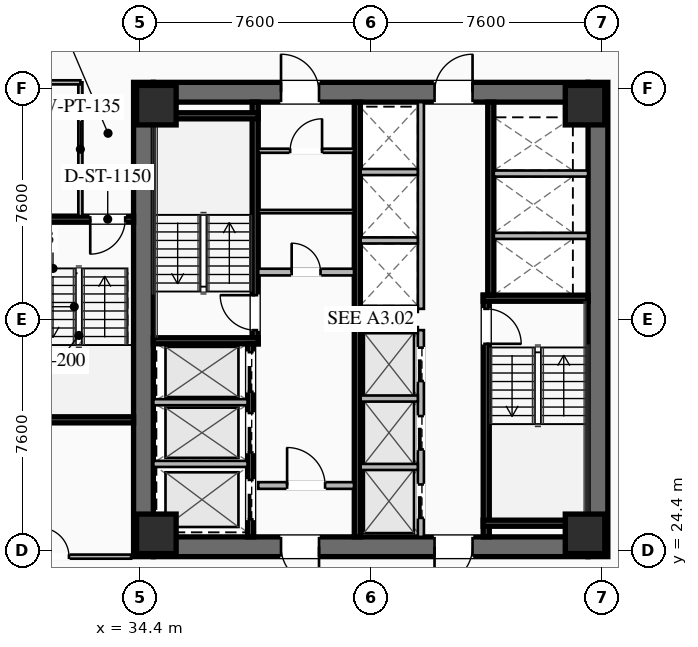
"""IFC4 building model, lengths in metres.
Left out: names, types, materials, properties, quantities, classifications, styles, units other than length and angle.
Written with IfcOpenShell. Run it as: python <this file> out.ifc"""

import sys

from ifc_helpers import new_model, si_unit, direction, frame, frame_2d, origin, origin_2d, place, context, subcontext, project, spatial, rectangle, hollow_rectangle, extrude, element, fill, save


model = new_model("IFC4")
c1 = context("Model", 3, precision=1e-05, world=origin(), true_north=direction((0.0, 1.0)))
c2 = subcontext(c1, "Body", "Model", "MODEL_VIEW")
j1 = project(units=[si_unit("LENGTHUNIT", "METRE"), si_unit("PLANEANGLEUNIT", "RADIAN")], contexts=[c1])
p1 = place(None, origin())
s1 = spatial("IfcSite", under=j1, at=p1, CompositionType="ELEMENT")
p2 = place(p1, origin())
s2 = spatial("IfcBuilding", under=s1, at=p2, CompositionType="ELEMENT")
p3 = place(p2, frame((0.0, 0.0, 84.95)))
s3 = spatial("IfcBuildingStorey", under=s2, at=p3, CompositionType="ELEMENT", Elevation=84.95)
for number, where, z_axis, x_axis in (
    (1, (34.525, 24.2, 0.0), (0.0, 0.0, 1.0), (0.0, 1.0, 0.0)),
    (2, (49.475, 39.8, 0.0), (0.0, 0.0, 1.0), (0.0, -1.0, 0.0)),
):
    element("IfcWall", number, at=place(p3, frame(where, z_axis=z_axis, x_axis=x_axis)), inside=s3, PredefinedType="SHEAR", context=c2, shape_type="SweptSolid", body=[
        extrude(rectangle(XDim=15.6, YDim=0.65, at=frame_2d((7.8, 0.0))), origin(), (0.0, 0.0, 1.0), 3.55),
    ])
p4 = place(p3, frame((49.15, 24.525, 0.0), z_axis=(0.0, 0.0, 1.0), x_axis=(-1.0, 0.0, 0.0)))
e3 = element("IfcWall", 3, at=p4, inside=s3, PredefinedType="SHEAR", context=c2, shape_type="SweptSolid", body=[
    extrude(rectangle(XDim=14.3, YDim=0.65, at=frame_2d((7.15, 0.0))), origin(), (0.0, 0.0, 1.0), 3.55),
])
p5 = place(p4, frame((8.85, 0.0, 0.0)))
e4 = element("IfcOpeningElement", 4, at=p5, cuts=e3, PredefinedType="OPENING", context=c2, shape_type="SweptSolid", body=[
    extrude(rectangle(XDim=1.25, YDim=2.25, at=frame_2d((0.625, 1.125))), frame((0.0, 0.335, 0.0), z_axis=(0.0, -1.0, 0.0), x_axis=(1.0, 0.0, 0.0)), (0.0, 0.0, 1.0), 0.67),
])
p6 = place(p4, frame((3.8, 0.0, 0.0)))
e5 = element("IfcOpeningElement", 5, at=p6, cuts=e3, PredefinedType="OPENING", context=c2, shape_type="SweptSolid", body=[
    extrude(rectangle(XDim=1.25, YDim=2.25, at=frame_2d((0.625, 1.125))), frame((0.0, 0.335, 0.0), z_axis=(0.0, -1.0, 0.0), x_axis=(1.0, 0.0, 0.0)), (0.0, 0.0, 1.0), 0.67),
])
p7 = place(p3, frame((34.85, 39.475, 0.0), z_axis=(0.0, 0.0, 1.0), x_axis=(1.0, 0.0, 0.0)))
e6 = element("IfcWall", 6, at=p7, inside=s3, PredefinedType="SHEAR", context=c2, shape_type="SweptSolid", body=[
    extrude(rectangle(XDim=14.3, YDim=0.65, at=frame_2d((7.15, 0.0))), origin(), (0.0, 0.0, 1.0), 3.55),
])
p8 = place(p7, frame((4.2, 0.0, 0.0)))
e7 = element("IfcOpeningElement", 7, at=p8, cuts=e6, PredefinedType="OPENING", context=c2, shape_type="SweptSolid", body=[
    extrude(rectangle(XDim=1.25, YDim=2.25, at=frame_2d((0.625, 1.125))), frame((0.0, 0.335, 0.0), z_axis=(0.0, -1.0, 0.0), x_axis=(1.0, 0.0, 0.0)), (0.0, 0.0, 1.0), 0.67),
])
p9 = place(p7, frame((9.25, 0.0, 0.0)))
e8 = element("IfcOpeningElement", 8, at=p9, cuts=e6, PredefinedType="OPENING", context=c2, shape_type="SweptSolid", body=[
    extrude(rectangle(XDim=1.25, YDim=2.25, at=frame_2d((0.625, 1.125))), frame((0.0, 0.335, 0.0), z_axis=(0.0, -1.0, 0.0), x_axis=(1.0, 0.0, 0.0)), (0.0, 0.0, 1.0), 0.67),
])
for number, where, z_axis, x_axis in (
    (9, (34.95, 24.95, 0.0), (0.0, 0.0, 1.0), (1.0, 0.0, 0.0)),
    (10, (49.05, 24.95, 0.0), (0.0, 0.0, 1.0), (1.0, 0.0, 0.0)),
    (11, (49.05, 39.05, 0.0), (0.0, 0.0, 1.0), (1.0, 0.0, 0.0)),
    (12, (34.95, 39.05, 0.0), (0.0, 0.0, 1.0), (1.0, 0.0, 0.0)),
):
    element("IfcColumn", number, at=place(p3, frame(where, z_axis=z_axis, x_axis=x_axis)), inside=s3, PredefinedType="COLUMN", context=c2, shape_type="SweptSolid", body=[
        extrude(hollow_rectangle(XDim=1.3, YDim=1.3, WallThickness=0.05, at=origin_2d()), origin(), (0.0, 0.0, 1.0), 3.35),
    ])
p10 = place(p3, frame((38.2, 31.2, 0.0), z_axis=(0.0, 0.0, 1.0), x_axis=(0.0, 1.0, 0.0)))
e13 = element("IfcWall", 13, at=p10, inside=s3, PredefinedType="SHEAR", context=c2, shape_type="SweptSolid", body=[
    extrude(rectangle(XDim=7.95, YDim=0.2, at=frame_2d((3.975, 0.0))), origin(), (0.0, 0.0, 1.0), 3.35),
])
p11 = place(p10, frame((0.45, 0.0, 0.0)))
e14 = element("IfcOpeningElement", 14, at=p11, cuts=e13, PredefinedType="OPENING", context=c2, shape_type="SweptSolid", body=[
    extrude(rectangle(XDim=1.15, YDim=2.2, at=frame_2d((0.575, 1.1))), frame((0.0, 0.11, 0.0), z_axis=(0.0, -1.0, 0.0), x_axis=(1.0, 0.0, 0.0)), (0.0, 0.0, 1.0), 0.22),
])
for number, where, z_axis, x_axis in (
    (15, (34.85, 31.3, 0.0), (0.0, 0.0, 1.0), (1.0, 0.0, 0.0)),
    (16, (34.85, 38.7, 0.0), (0.0, 0.0, 1.0), (1.0, 0.0, 0.0)),
):
    element("IfcWall", number, at=place(p3, frame(where, z_axis=z_axis, x_axis=x_axis)), inside=s3, PredefinedType="SHEAR", context=c2, shape_type="SweptSolid", body=[
        extrude(rectangle(XDim=3.45, YDim=0.2, at=frame_2d((1.725, 0.0))), origin(), (0.0, 0.0, 1.0), 3.35),
    ])
p12 = place(p3, frame((45.8, 32.8, 0.0), z_axis=(0.0, 0.0, 1.0), x_axis=(0.0, -1.0, 0.0)))
e17 = element("IfcWall", 17, at=p12, inside=s3, PredefinedType="SHEAR", context=c2, shape_type="SweptSolid", body=[
    extrude(rectangle(XDim=7.95, YDim=0.2, at=frame_2d((3.975, 0.0))), origin(), (0.0, 0.0, 1.0), 3.35),
])
p13 = place(p12, frame((0.45, 0.0, 0.0)))
e18 = element("IfcOpeningElement", 18, at=p13, cuts=e17, PredefinedType="OPENING", context=c2, shape_type="SweptSolid", body=[
    extrude(rectangle(XDim=1.15, YDim=2.2, at=frame_2d((0.575, 1.1))), frame((0.0, 0.11, 0.0), z_axis=(0.0, -1.0, 0.0), x_axis=(1.0, 0.0, 0.0)), (0.0, 0.0, 1.0), 0.22),
])
for number, where, z_axis, x_axis in (
    (19, (45.7, 32.7, 0.0), (0.0, 0.0, 1.0), (1.0, 0.0, 0.0)),
    (20, (45.7, 25.3, 0.0), (0.0, 0.0, 1.0), (1.0, 0.0, 0.0)),
):
    element("IfcWall", number, at=place(p3, frame(where, z_axis=z_axis, x_axis=x_axis)), inside=s3, PredefinedType="SHEAR", context=c2, shape_type="SweptSolid", body=[
        extrude(rectangle(XDim=3.45, YDim=0.2, at=frame_2d((1.725, 0.0))), origin(), (0.0, 0.0, 1.0), 3.35),
    ])
p14 = place(p3, frame((41.56, 24.85, 0.0), z_axis=(0.0, 0.0, 1.0), x_axis=(0.0, 1.0, 0.0)))
e21 = element("IfcWall", 21, at=p14, inside=s3, PredefinedType="SHEAR", context=c2, shape_type="SweptSolid", body=[
    extrude(rectangle(XDim=14.3, YDim=0.2, at=frame_2d((7.15, 0.0))), origin(), (0.0, 0.0, 1.0), 3.35),
])
p15 = place(p3, frame((38.3, 33.56, 0.0), z_axis=(0.0, 0.0, 1.0), x_axis=(1.0, 0.0, 0.0)))
e22 = element("IfcWall", 22, at=p15, inside=s3, PredefinedType="SOLIDWALL", context=c2, shape_type="SweptSolid", body=[
    extrude(rectangle(XDim=3.15, YDim=0.22, at=frame_2d((1.575, 0.0))), origin(), (0.0, 0.0, 1.0), 2.703),
])
p16 = place(p15, frame((1.1, 0.0, 0.0)))
e23 = element("IfcOpeningElement", 23, at=p16, cuts=e22, PredefinedType="OPENING", context=c2, shape_type="SweptSolid", body=[
    extrude(rectangle(XDim=0.95, YDim=2.05, at=frame_2d((0.475, 1.025))), frame((0.0, 0.12, 0.0), z_axis=(0.0, -1.0, 0.0), x_axis=(1.0, 0.0, 0.0)), (0.0, 0.0, 1.0), 0.24),
])
p17 = place(p3, frame((38.3, 26.54, 0.0), z_axis=(0.0, 0.0, 1.0), x_axis=(1.0, 0.0, 0.0)))
e24 = element("IfcWall", 24, at=p17, inside=s3, PredefinedType="SOLIDWALL", context=c2, shape_type="SweptSolid", body=[
    extrude(rectangle(XDim=3.15, YDim=0.22, at=frame_2d((1.575, 0.0))), origin(), (0.0, 0.0, 1.0), 2.703),
])
p18 = place(p17, frame((0.95, 0.0, 0.0)))
e25 = element("IfcOpeningElement", 25, at=p18, cuts=e24, PredefinedType="OPENING", context=c2, shape_type="SweptSolid", body=[
    extrude(rectangle(XDim=1.25, YDim=2.25, at=frame_2d((0.625, 1.125))), frame((0.0, 0.12, 0.0), z_axis=(0.0, -1.0, 0.0), x_axis=(1.0, 0.0, 0.0)), (0.0, 0.0, 1.0), 0.24),
])
p19 = place(p3, frame((38.05, 24.85, 0.0), z_axis=(0.0, 0.0, 1.0), x_axis=(0.0, 1.0, 0.0)))
e26 = element("IfcWall", 26, at=p19, inside=s3, PredefinedType="SHEAR", context=c2, shape_type="SweptSolid", body=[
    extrude(rectangle(XDim=6.35, YDim=0.2, at=frame_2d((3.175, 0.0))), origin(), (0.0, 0.0, 1.0), 3.35),
])
p20 = place(p19, frame((4.775, 0.0, 0.0)))
e27 = element("IfcOpeningElement", 27, at=p20, cuts=e26, PredefinedType="OPENING", context=c2, shape_type="SweptSolid", body=[
    extrude(rectangle(XDim=1.3, YDim=2.25, at=frame_2d((0.65, 1.125))), frame((0.0, 0.11, 0.0), z_axis=(0.0, -1.0, 0.0), x_axis=(1.0, 0.0, 0.0)), (0.0, 0.0, 1.0), 0.22),
])
p21 = place(p19, frame((2.775, 0.0, 0.0)))
e28 = element("IfcOpeningElement", 28, at=p21, cuts=e26, PredefinedType="OPENING", context=c2, shape_type="SweptSolid", body=[
    extrude(rectangle(XDim=1.3, YDim=2.25, at=frame_2d((0.65, 1.125))), frame((0.0, 0.11, 0.0), z_axis=(0.0, -1.0, 0.0), x_axis=(1.0, 0.0, 0.0)), (0.0, 0.0, 1.0), 0.22),
])
p22 = place(p19, frame((0.575, 0.0, 0.0)))
e29 = element("IfcOpeningElement", 29, at=p22, cuts=e26, PredefinedType="OPENING", context=c2, shape_type="SweptSolid", body=[
    extrude(rectangle(XDim=1.3, YDim=2.25, at=frame_2d((0.65, 1.125))), frame((0.0, 0.11, 0.0), z_axis=(0.0, -1.0, 0.0), x_axis=(1.0, 0.0, 0.0)), (0.0, 0.0, 1.0), 0.22),
])
for number, where, z_axis, x_axis in (
    (30, (34.85, 27.25, 0.0), (0.0, 0.0, 1.0), (1.0, 0.0, 0.0)),
    (31, (34.85, 29.28, 0.0), (0.0, 0.0, 1.0), (1.0, 0.0, 0.0)),
):
    element("IfcWall", number, at=place(p3, frame(where, z_axis=z_axis, x_axis=x_axis)), inside=s3, PredefinedType="SOLIDWALL", context=c2, shape_type="SweptSolid", body=[
        extrude(rectangle(XDim=3.1, YDim=0.2, at=frame_2d((1.55, 0.0))), origin(), (0.0, 0.0, 1.0), 3.35),
    ])
p23 = place(p3, frame((45.95, 39.15, 0.0), z_axis=(0.0, 0.0, 1.0), x_axis=(0.0, -1.0, 0.0)))
e32 = element("IfcWall", 32, at=p23, inside=s3, PredefinedType="SHEAR", context=c2, shape_type="SweptSolid", body=[
    extrude(rectangle(XDim=6.35, YDim=0.2, at=frame_2d((3.175, 0.0))), origin(), (0.0, 0.0, 1.0), 3.35),
])
for number, where, z_axis, x_axis in (
    (33, (46.05, 34.75, 0.0), (0.0, 0.0, 1.0), (1.0, 0.0, 0.0)),
    (34, (46.05, 36.8, 0.0), (0.0, 0.0, 1.0), (1.0, 0.0, 0.0)),
):
    element("IfcWall", number, at=place(p3, frame(where, z_axis=z_axis, x_axis=x_axis)), inside=s3, PredefinedType="SOLIDWALL", context=c2, shape_type="SweptSolid", body=[
        extrude(rectangle(XDim=3.1, YDim=0.2, at=frame_2d((1.55, 0.0))), origin(), (0.0, 0.0, 1.0), 3.35),
    ])
p24 = place(p3, frame((38.3, 37.55, 0.0), z_axis=(0.0, 0.0, 1.0), x_axis=(1.0, 0.0, 0.0)))
e35 = element("IfcWall", 35, at=p24, inside=s3, PredefinedType="PARTITIONING", context=c2, shape_type="SweptSolid", body=[
    extrude(rectangle(XDim=3.15, YDim=0.135, at=frame_2d((1.575, 0.0))), origin(), (0.0, 0.0, 1.0), 2.703),
])
p25 = place(p24, frame((1.05, 0.0, 0.0)))
e36 = element("IfcOpeningElement", 36, at=p25, cuts=e35, PredefinedType="OPENING", context=c2, shape_type="SweptSolid", body=[
    extrude(rectangle(XDim=1.05, YDim=2.2, at=frame_2d((0.525, 1.1))), frame((0.0, 0.077, 0.0), z_axis=(0.0, -1.0, 0.0), x_axis=(1.0, 0.0, 0.0)), (0.0, 0.0, 1.0), 0.155),
])
p26 = place(p3, frame((38.3, 35.55, 0.0), z_axis=(0.0, 0.0, 1.0), x_axis=(1.0, 0.0, 0.0)))
e37 = element("IfcWall", 37, at=p26, inside=s3, PredefinedType="PARTITIONING", context=c2, shape_type="SweptSolid", body=[
    extrude(rectangle(XDim=3.15, YDim=0.11, at=frame_2d((1.575, 0.0))), origin(), (0.0, 0.0, 1.0), 2.703),
])
p27 = place(p3, frame((43.65, 24.85, 0.0), z_axis=(0.0, 0.0, 1.0), x_axis=(0.0, 1.0, 0.0)))
e38 = element("IfcWall", 38, at=p27, inside=s3, PredefinedType="SOLIDWALL", context=c2, shape_type="SweptSolid", body=[
    extrude(rectangle(XDim=6.8, YDim=0.2, at=frame_2d((3.4, 0.0))), origin(), (0.0, 0.0, 1.0), 3.35),
])
p28 = place(p27, frame((0.625, 0.0, 0.0)))
e39 = element("IfcOpeningElement", 39, at=p28, cuts=e38, PredefinedType="OPENING", context=c2, shape_type="SweptSolid", body=[
    extrude(rectangle(XDim=1.1, YDim=2.2, at=frame_2d((0.55, 1.1))), frame((0.0, 0.11, 0.0), z_axis=(0.0, -1.0, 0.0), x_axis=(1.0, 0.0, 0.0)), (0.0, 0.0, 1.0), 0.22),
])
p29 = place(p27, frame((2.875, 0.0, 0.0)))
e40 = element("IfcOpeningElement", 40, at=p29, cuts=e38, PredefinedType="OPENING", context=c2, shape_type="SweptSolid", body=[
    extrude(rectangle(XDim=1.1, YDim=2.2, at=frame_2d((0.55, 1.1))), frame((0.0, 0.11, 0.0), z_axis=(0.0, -1.0, 0.0), x_axis=(1.0, 0.0, 0.0)), (0.0, 0.0, 1.0), 0.22),
])
p30 = place(p27, frame((5.125, 0.0, 0.0)))
e41 = element("IfcOpeningElement", 41, at=p30, cuts=e38, PredefinedType="OPENING", context=c2, shape_type="SweptSolid", body=[
    extrude(rectangle(XDim=1.1, YDim=2.2, at=frame_2d((0.55, 1.1))), frame((0.0, 0.11, 0.0), z_axis=(0.0, -1.0, 0.0), x_axis=(1.0, 0.0, 0.0)), (0.0, 0.0, 1.0), 0.22),
])
for number, where, z_axis, x_axis in (
    (42, (41.67, 27.15, 0.0), (0.0, 0.0, 1.0), (1.0, 0.0, 0.0)),
    (43, (41.67, 29.4, 0.0), (0.0, 0.0, 1.0), (1.0, 0.0, 0.0)),
    (44, (41.67, 31.65, 0.0), (0.0, 0.0, 1.0), (1.0, 0.0, 0.0)),
):
    element("IfcWall", number, at=place(p3, frame(where, z_axis=z_axis, x_axis=x_axis)), inside=s3, PredefinedType="SOLIDWALL", context=c2, shape_type="SweptSolid", body=[
        extrude(rectangle(XDim=1.88, YDim=0.2, at=frame_2d((0.94, 0.0))), origin(), (0.0, 0.0, 1.0), 3.35),
    ])
p31 = place(p3, frame((43.65, 32.35, 0.0), z_axis=(0.0, 0.0, 1.0), x_axis=(0.0, 1.0, 0.0)))
e45 = element("IfcWall", 45, at=p31, inside=s3, PredefinedType="SOLIDWALL", context=c2, shape_type="SweptSolid", body=[
    extrude(rectangle(XDim=6.8, YDim=0.2, at=frame_2d((3.4, 0.0))), origin(), (0.0, 0.0, 1.0), 3.35),
])
for number, where, z_axis, x_axis in (
    (46, (41.67, 32.35, 0.0), (0.0, 0.0, 1.0), (1.0, 0.0, 0.0)),
    (47, (41.67, 34.6, 0.0), (0.0, 0.0, 1.0), (1.0, 0.0, 0.0)),
    (48, (41.67, 36.85, 0.0), (0.0, 0.0, 1.0), (1.0, 0.0, 0.0)),
):
    element("IfcWall", number, at=place(p3, frame(where, z_axis=z_axis, x_axis=x_axis)), inside=s3, PredefinedType="SOLIDWALL", context=c2, shape_type="SweptSolid", body=[
        extrude(rectangle(XDim=1.88, YDim=0.2, at=frame_2d((0.94, 0.0))), origin(), (0.0, 0.0, 1.0), 3.35),
    ])
p32 = place(p3, frame((34.2, 35.3, 0.0), z_axis=(0.0, 0.0, 1.0), x_axis=(-1.0, 0.0, 0.0)))
e49 = element("IfcWall", 49, at=p32, inside=s3, PredefinedType="SHEAR", context=c2, shape_type="SweptSolid", body=[
    extrude(rectangle(XDim=3.4, YDim=0.2, at=frame_2d((1.7, 0.0))), origin(), (0.0, 0.0, 1.0), 3.35),
])
p33 = place(p32, frame((0.275, 0.0, 0.0)))
e50 = element("IfcOpeningElement", 50, at=p33, cuts=e49, PredefinedType="OPENING", context=c2, shape_type="SweptSolid", body=[
    extrude(rectangle(XDim=1.15, YDim=2.2, at=frame_2d((0.575, 1.1))), frame((0.0, 0.11, 0.0), z_axis=(0.0, -1.0, 0.0), x_axis=(1.0, 0.0, 0.0)), (0.0, 0.0, 1.0), 0.22),
])
p34 = place(p3, frame((30.8, 28.7, 0.0), z_axis=(0.0, 0.0, 1.0), x_axis=(1.0, 0.0, 0.0)))
e51 = element("IfcWall", 51, at=p34, inside=s3, PredefinedType="SHEAR", context=c2, shape_type="SweptSolid", body=[
    extrude(rectangle(XDim=3.4, YDim=0.2, at=frame_2d((1.7, 0.0))), origin(), (0.0, 0.0, 1.0), 3.35),
])
p35 = place(p3, frame((32.45, 35.4, 0.0), z_axis=(0.0, 0.0, 1.0), x_axis=(0.0, 1.0, 0.0)))
e52 = element("IfcWall", 52, at=p35, inside=s3, PredefinedType="PARTITIONING", context=c2, shape_type="SweptSolid", body=[
    extrude(rectangle(XDim=4.4, YDim=0.135, at=frame_2d((2.2, 0.0))), origin(), (0.0, 0.0, 1.0), 2.703),
])
p36 = place(p3, frame((32.45, 39.8, 0.0), z_axis=(0.0, 0.0, 1.0), x_axis=(-1.0, 0.0, 0.0)))
e53 = element("IfcWall", 53, at=p36, inside=s3, PredefinedType="PARTITIONING", context=c2, shape_type="SweptSolid", body=[
    extrude(rectangle(XDim=11.43, YDim=0.135, at=frame_2d((5.715, 0.0))), origin(), (0.0, 0.0, 1.0), 2.703),
])
p37 = place(p36, frame((4.89, 0.0, 0.0)))
e54 = element("IfcOpeningElement", 54, at=p37, cuts=e53, PredefinedType="OPENING", context=c2, shape_type="SweptSolid", body=[
    extrude(rectangle(XDim=0.95, YDim=2.05, at=frame_2d((0.475, 1.025))), frame((0.0, 0.077, 0.0), z_axis=(0.0, -1.0, 0.0), x_axis=(1.0, 0.0, 0.0)), (0.0, 0.0, 1.0), 0.155),
])
p38 = place(p3, frame((21.02, 24.2, 0.0), z_axis=(0.0, 0.0, 1.0), x_axis=(1.0, 0.0, 0.0)))
e55 = element("IfcWall", 55, at=p38, inside=s3, PredefinedType="PARTITIONING", context=c2, shape_type="SweptSolid", body=[
    extrude(rectangle(XDim=13.1, YDim=0.135, at=frame_2d((6.55, 0.0))), origin(), (0.0, 0.0, 1.0), 2.703),
])
p39 = place(p38, frame((10.105, 0.0, 0.0)))
e56 = element("IfcOpeningElement", 56, at=p39, cuts=e55, PredefinedType="OPENING", context=c2, shape_type="SweptSolid", body=[
    extrude(rectangle(XDim=0.95, YDim=2.05, at=frame_2d((0.475, 1.025))), frame((0.0, 0.077, 0.0), z_axis=(0.0, -1.0, 0.0), x_axis=(1.0, 0.0, 0.0)), (0.0, 0.0, 1.0), 0.155),
])
p40 = place(p8, origin())
e57 = element("IfcDoor", 57, at=p40, inside=s3, OperationType="SINGLE_SWING_LEFT", PredefinedType="DOOR", context=c2, shape_type="SweptSolid", body=[
    extrude(rectangle(XDim=1.25, YDim=2.25, at=frame_2d((0.625, 1.125))), frame((0.0, 0.025, 0.0), z_axis=(0.0, -1.0, 0.0), x_axis=(1.0, 0.0, 0.0)), (0.0, 0.0, 1.0), 0.05),
])
fill(e7, e57)
p41 = place(p9, origin())
e58 = element("IfcDoor", 58, at=p41, inside=s3, OperationType="SINGLE_SWING_RIGHT", PredefinedType="DOOR", context=c2, shape_type="SweptSolid", body=[
    extrude(rectangle(XDim=1.25, YDim=2.25, at=frame_2d((0.625, 1.125))), frame((0.0, 0.025, 0.0), z_axis=(0.0, -1.0, 0.0), x_axis=(1.0, 0.0, 0.0)), (0.0, 0.0, 1.0), 0.05),
])
fill(e8, e58)
p42 = place(p5, origin())
e59 = element("IfcDoor", 59, at=p42, inside=s3, OperationType="SINGLE_SWING_LEFT", PredefinedType="DOOR", context=c2, shape_type="SweptSolid", body=[
    extrude(rectangle(XDim=1.25, YDim=2.25, at=frame_2d((0.625, 1.125))), frame((0.0, 0.025, 0.0), z_axis=(0.0, -1.0, 0.0), x_axis=(1.0, 0.0, 0.0)), (0.0, 0.0, 1.0), 0.05),
])
fill(e4, e59)
p43 = place(p6, origin())
e60 = element("IfcDoor", 60, at=p43, inside=s3, OperationType="SINGLE_SWING_RIGHT", PredefinedType="DOOR", context=c2, shape_type="SweptSolid", body=[
    extrude(rectangle(XDim=1.25, YDim=2.25, at=frame_2d((0.625, 1.125))), frame((0.0, 0.025, 0.0), z_axis=(0.0, -1.0, 0.0), x_axis=(1.0, 0.0, 0.0)), (0.0, 0.0, 1.0), 0.05),
])
fill(e5, e60)
p44 = place(p11, origin())
e61 = element("IfcDoor", 61, at=p44, inside=s3, OperationType="SINGLE_SWING_RIGHT", PredefinedType="DOOR", context=c2, shape_type="SweptSolid", body=[
    extrude(rectangle(XDim=1.15, YDim=2.2, at=frame_2d((0.575, 1.1))), frame((0.0, 0.025, 0.0), z_axis=(0.0, -1.0, 0.0), x_axis=(1.0, 0.0, 0.0)), (0.0, 0.0, 1.0), 0.05),
])
fill(e14, e61)
p45 = place(p13, origin())
e62 = element("IfcDoor", 62, at=p45, inside=s3, OperationType="SINGLE_SWING_RIGHT", PredefinedType="DOOR", context=c2, shape_type="SweptSolid", body=[
    extrude(rectangle(XDim=1.15, YDim=2.2, at=frame_2d((0.575, 1.1))), frame((0.0, 0.025, 0.0), z_axis=(0.0, -1.0, 0.0), x_axis=(1.0, 0.0, 0.0)), (0.0, 0.0, 1.0), 0.05),
])
fill(e18, e62)
p46 = place(p18, origin())
e63 = element("IfcDoor", 63, at=p46, inside=s3, OperationType="SINGLE_SWING_LEFT", PredefinedType="DOOR", context=c2, shape_type="SweptSolid", body=[
    extrude(rectangle(XDim=1.25, YDim=2.25, at=frame_2d((0.625, 1.125))), frame((0.0, 0.025, 0.0), z_axis=(0.0, -1.0, 0.0), x_axis=(1.0, 0.0, 0.0)), (0.0, 0.0, 1.0), 0.05),
])
fill(e25, e63)
p47 = place(p25, origin())
e64 = element("IfcDoor", 64, at=p47, inside=s3, OperationType="SINGLE_SWING_RIGHT", PredefinedType="DOOR", context=c2, shape_type="SweptSolid", body=[
    extrude(rectangle(XDim=1.05, YDim=2.2, at=frame_2d((0.525, 1.1))), frame((0.0, 0.025, 0.0), z_axis=(0.0, -1.0, 0.0), x_axis=(1.0, 0.0, 0.0)), (0.0, 0.0, 1.0), 0.05),
])
fill(e36, e64)
p48 = place(p16, origin())
e65 = element("IfcDoor", 65, at=p48, inside=s3, OperationType="SINGLE_SWING_LEFT", PredefinedType="DOOR", context=c2, shape_type="SweptSolid", body=[
    extrude(rectangle(XDim=0.95, YDim=2.05, at=frame_2d((0.475, 1.025))), frame((0.0, 0.025, 0.0), z_axis=(0.0, -1.0, 0.0), x_axis=(1.0, 0.0, 0.0)), (0.0, 0.0, 1.0), 0.05),
])
fill(e23, e65)
p49 = place(p33, origin())
e66 = element("IfcDoor", 66, at=p49, inside=s3, OperationType="SINGLE_SWING_RIGHT", PredefinedType="DOOR", context=c2, shape_type="SweptSolid", body=[
    extrude(rectangle(XDim=1.15, YDim=2.2, at=frame_2d((0.575, 1.1))), frame((0.0, 0.025, 0.0), z_axis=(0.0, -1.0, 0.0), x_axis=(1.0, 0.0, 0.0)), (0.0, 0.0, 1.0), 0.05),
])
fill(e50, e66)
p50 = place(p39, origin())
e67 = element("IfcDoor", 67, at=p50, inside=s3, OperationType="SINGLE_SWING_LEFT", PredefinedType="DOOR", context=c2, shape_type="SweptSolid", body=[
    extrude(rectangle(XDim=0.95, YDim=2.05, at=frame_2d((0.475, 1.025))), frame((0.0, 0.025, 0.0), z_axis=(0.0, -1.0, 0.0), x_axis=(1.0, 0.0, 0.0)), (0.0, 0.0, 1.0), 0.05),
])
fill(e56, e67)
p51 = place(p20, origin())
e68 = element("IfcDoor", 68, at=p51, inside=s3, OperationType="SLIDING_TO_LEFT", PredefinedType="DOOR", context=c2, shape_type="SweptSolid", body=[
    extrude(rectangle(XDim=1.3, YDim=2.25, at=frame_2d((0.65, 1.125))), frame((0.0, 0.025, 0.0), z_axis=(0.0, -1.0, 0.0), x_axis=(1.0, 0.0, 0.0)), (0.0, 0.0, 1.0), 0.05),
])
fill(e27, e68)
p52 = place(p21, origin())
e69 = element("IfcDoor", 69, at=p52, inside=s3, OperationType="SLIDING_TO_LEFT", PredefinedType="DOOR", context=c2, shape_type="SweptSolid", body=[
    extrude(rectangle(XDim=1.3, YDim=2.25, at=frame_2d((0.65, 1.125))), frame((0.0, 0.025, 0.0), z_axis=(0.0, -1.0, 0.0), x_axis=(1.0, 0.0, 0.0)), (0.0, 0.0, 1.0), 0.05),
])
fill(e28, e69)
p53 = place(p22, origin())
e70 = element("IfcDoor", 70, at=p53, inside=s3, OperationType="SLIDING_TO_LEFT", PredefinedType="DOOR", context=c2, shape_type="SweptSolid", body=[
    extrude(rectangle(XDim=1.3, YDim=2.25, at=frame_2d((0.65, 1.125))), frame((0.0, 0.025, 0.0), z_axis=(0.0, -1.0, 0.0), x_axis=(1.0, 0.0, 0.0)), (0.0, 0.0, 1.0), 0.05),
])
fill(e29, e70)
p54 = place(p28, origin())
e71 = element("IfcDoor", 71, at=p54, inside=s3, OperationType="SLIDING_TO_LEFT", PredefinedType="DOOR", context=c2, shape_type="SweptSolid", body=[
    extrude(rectangle(XDim=1.1, YDim=2.2, at=frame_2d((0.55, 1.1))), frame((0.0, 0.025, 0.0), z_axis=(0.0, -1.0, 0.0), x_axis=(1.0, 0.0, 0.0)), (0.0, 0.0, 1.0), 0.05),
])
fill(e39, e71)
p55 = place(p29, origin())
e72 = element("IfcDoor", 72, at=p55, inside=s3, OperationType="SLIDING_TO_LEFT", PredefinedType="DOOR", context=c2, shape_type="SweptSolid", body=[
    extrude(rectangle(XDim=1.1, YDim=2.2, at=frame_2d((0.55, 1.1))), frame((0.0, 0.025, 0.0), z_axis=(0.0, -1.0, 0.0), x_axis=(1.0, 0.0, 0.0)), (0.0, 0.0, 1.0), 0.05),
])
fill(e40, e72)
p56 = place(p30, origin())
e73 = element("IfcDoor", 73, at=p56, inside=s3, OperationType="SLIDING_TO_LEFT", PredefinedType="DOOR", context=c2, shape_type="SweptSolid", body=[
    extrude(rectangle(XDim=1.1, YDim=2.2, at=frame_2d((0.55, 1.1))), frame((0.0, 0.025, 0.0), z_axis=(0.0, -1.0, 0.0), x_axis=(1.0, 0.0, 0.0)), (0.0, 0.0, 1.0), 0.05),
])
fill(e41, e73)
save(model, sys.argv[1])
